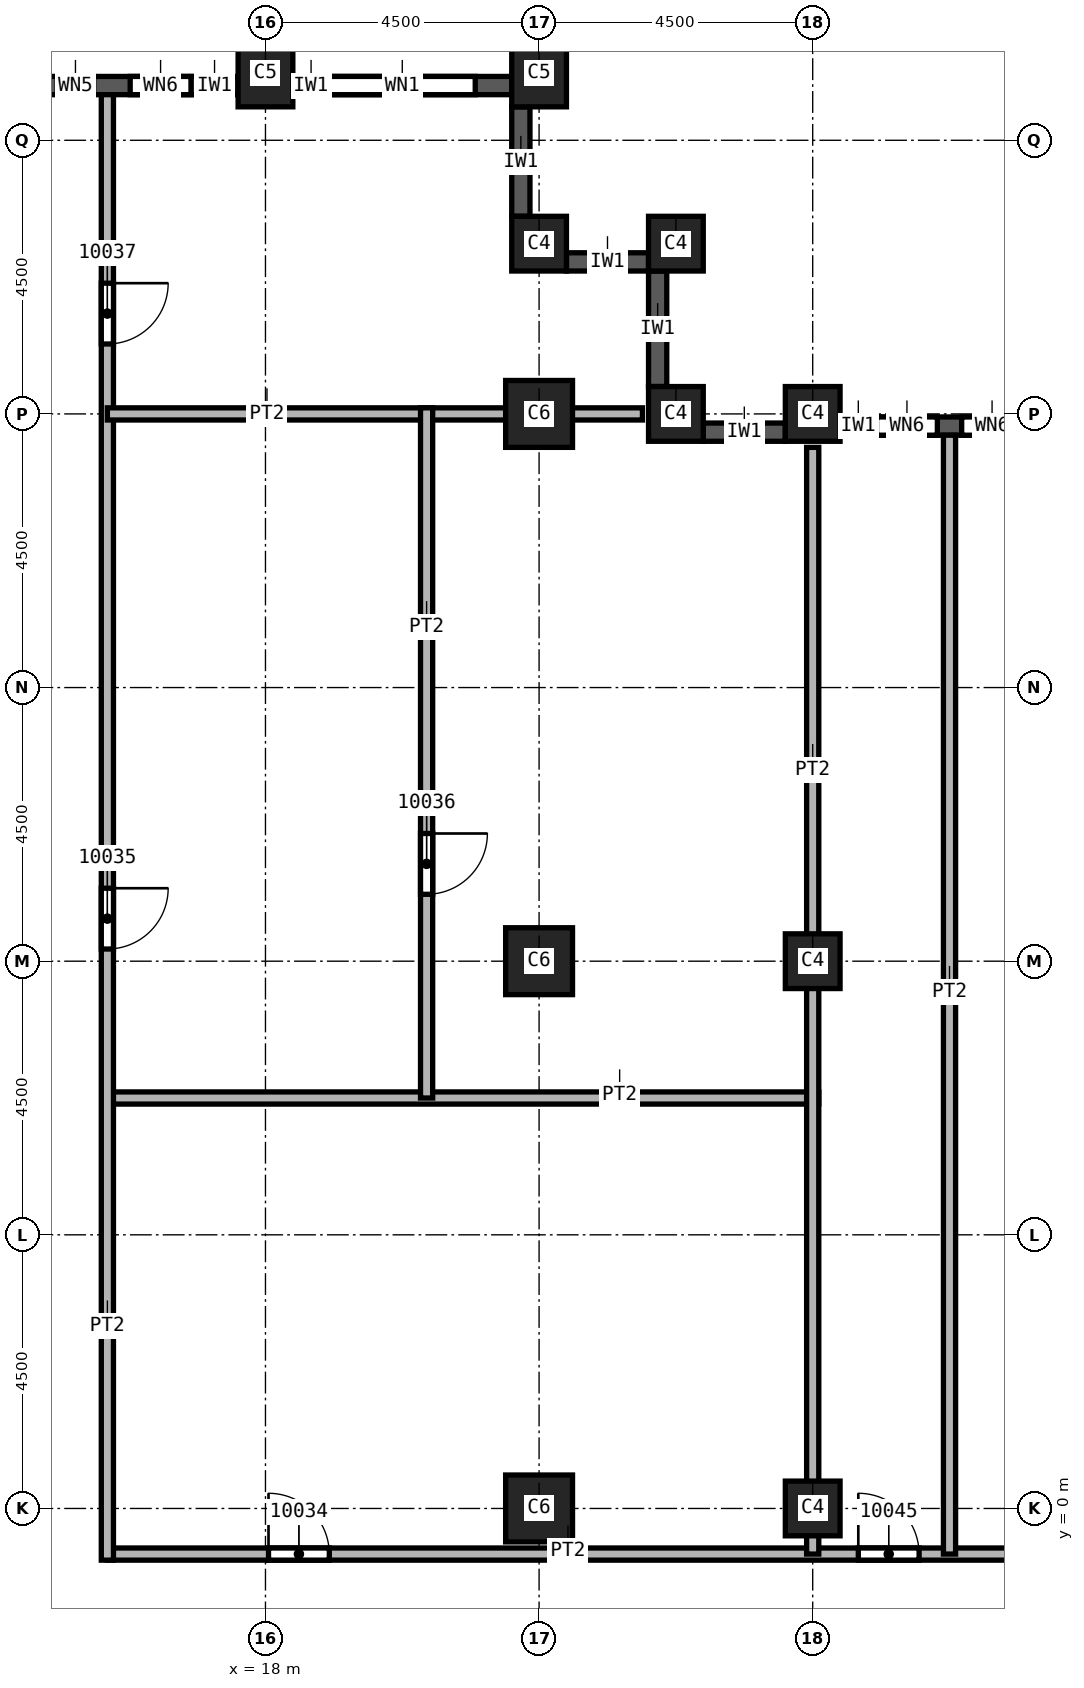
"""IFC4 building model, lengths in metres.
Left out: names, types, materials, properties, quantities, classifications, styles, units other than length and angle.
Written with IfcOpenShell. Run it as: python <this file> out.ifc"""

import sys

from ifc_helpers import new_model, si_unit, direction, frame, frame_2d, origin, origin_2d, place, context, subcontext, project, spatial, rectangle, extrude, element, fill, save


model = new_model("IFC4")
c1 = context("Model", 3, precision=1e-05, world=origin(), true_north=direction((0.0, 1.0)))
c2 = subcontext(c1, "Body", "Model", "MODEL_VIEW")
j1 = project(units=[si_unit("LENGTHUNIT", "METRE"), si_unit("PLANEANGLEUNIT", "RADIAN")], contexts=[c1])
p1 = place(None, origin())
s1 = spatial("IfcSite", under=j1, at=p1, CompositionType="ELEMENT")
p2 = place(p1, origin())
s2 = spatial("IfcBuilding", under=s1, at=p2, CompositionType="ELEMENT")
p3 = place(p2, frame((0.0, 0.0, 170.0)))
s3 = spatial("IfcBuildingStorey", under=s2, at=p3, CompositionType="ELEMENT", Elevation=170.0)
for number, where, z_axis, x_axis in (
    (1, (22.5, 0.0, 0.0), (0.0, 0.0, 1.0), (1.0, 0.0, 0.0)),
    (2, (22.5, 9.0, 0.0), (0.0, 0.0, 1.0), (1.0, 0.0, 0.0)),
    (3, (22.5, 18.0, 0.0), (0.0, 0.0, 1.0), (1.0, 0.0, 0.0)),
):
    element("IfcColumn", number, at=place(p3, frame(where, z_axis=z_axis, x_axis=x_axis)), inside=s3, PredefinedType="COLUMN", context=c2, shape_type="SweptSolid", body=[
        extrude(rectangle(XDim=1.1, YDim=1.1, at=origin_2d()), origin(), (0.0, 0.0, 1.0), 3.7),
    ])
for number, where, z_axis, x_axis in (
    (4, (27.0, 0.0, 0.0), (0.0, 0.0, 1.0), (1.0, 0.0, 0.0)),
    (5, (27.0, 9.0, 0.0), (0.0, 0.0, 1.0), (1.0, 0.0, 0.0)),
    (6, (27.0, 18.0, 0.0), (0.0, 0.0, 1.0), (1.0, 0.0, 0.0)),
):
    element("IfcColumn", number, at=place(p3, frame(where, z_axis=z_axis, x_axis=x_axis)), inside=s3, PredefinedType="COLUMN", context=c2, shape_type="SweptSolid", body=[
        extrude(rectangle(XDim=0.9, YDim=0.9, at=origin_2d()), origin(), (0.0, 0.0, 1.0), 3.7),
    ])
for number, where, z_axis, x_axis in (
    (7, (18.0, 23.6, 0.0), (0.0, 0.0, 1.0), (1.0, 0.0, 0.0)),
    (8, (22.5, 23.6, 0.0), (0.0, 0.0, 1.0), (1.0, 0.0, 0.0)),
):
    element("IfcColumn", number, at=place(p3, frame(where, z_axis=z_axis, x_axis=x_axis)), inside=s3, PredefinedType="COLUMN", context=c2, shape_type="SweptSolid", body=[
        extrude(rectangle(XDim=0.9, YDim=1.1, at=origin_2d()), origin(), (0.0, 0.0, 1.0), 3.7),
    ])
for number, where, z_axis, x_axis in (
    (9, (22.5, 20.8, 0.0), (0.0, 0.0, 1.0), (1.0, 0.0, 0.0)),
    (10, (24.75, 20.8, 0.0), (0.0, 0.0, 1.0), (1.0, 0.0, 0.0)),
    (11, (24.75, 18.0, 0.0), (0.0, 0.0, 1.0), (1.0, 0.0, 0.0)),
):
    element("IfcColumn", number, at=place(p3, frame(where, z_axis=z_axis, x_axis=x_axis)), inside=s3, PredefinedType="COLUMN", context=c2, shape_type="SweptSolid", body=[
        extrude(rectangle(XDim=0.9, YDim=0.9, at=origin_2d()), origin(), (0.0, 0.0, 1.0), 3.7),
    ])
p4 = place(p3, frame((31.05, 17.8, 0.0), z_axis=(0.0, 0.0, 1.0), x_axis=(-1.0, 0.0, 0.0)))
e12 = element("IfcWall", 12, at=p4, inside=s3, PredefinedType="SOLIDWALL", context=c2, shape_type="SweptSolid", body=[
    extrude(rectangle(XDim=3.6, YDim=0.3, at=frame_2d((1.8, 0.0))), origin(), (0.0, 0.0, 1.0), 3.1),
])
p5 = place(p4, frame((0.6, 0.0, 0.8)))
e13 = element("IfcOpeningElement", 13, at=p5, cuts=e12, PredefinedType="OPENING", context=c2, shape_type="SweptSolid", body=[
    extrude(rectangle(XDim=1.0, YDim=1.95, at=frame_2d((0.5, 0.975))), frame((0.0, 0.15, 0.0), z_axis=(0.0, -1.0, 0.0), x_axis=(1.0, 0.0, 0.0)), (0.0, 0.0, 1.0), 0.3),
])
p6 = place(p4, frame((2.0, 0.0, 0.8)))
e14 = element("IfcOpeningElement", 14, at=p6, cuts=e12, PredefinedType="OPENING", context=c2, shape_type="SweptSolid", body=[
    extrude(rectangle(XDim=1.0, YDim=1.95, at=frame_2d((0.5, 0.975))), frame((0.0, 0.15, 0.0), z_axis=(0.0, -1.0, 0.0), x_axis=(1.0, 0.0, 0.0)), (0.0, 0.0, 1.0), 0.3),
])
p7 = place(p3, frame((26.55, 17.7, 0.0), z_axis=(0.0, 0.0, 1.0), x_axis=(-1.0, 0.0, 0.0)))
e15 = element("IfcWall", 15, at=p7, inside=s3, PredefinedType="SOLIDWALL", context=c2, shape_type="SweptSolid", body=[
    extrude(rectangle(XDim=1.35, YDim=0.3, at=frame_2d((0.675, 0.0))), origin(), (0.0, 0.0, 1.0), 3.1),
])
p8 = place(p3, frame((24.45, 18.45, 0.0), z_axis=(0.0, 0.0, 1.0), x_axis=(0.0, 1.0, 0.0)))
e16 = element("IfcWall", 16, at=p8, inside=s3, PredefinedType="SOLIDWALL", context=c2, shape_type="SweptSolid", body=[
    extrude(rectangle(XDim=1.9, YDim=0.3, at=frame_2d((0.95, 0.0))), origin(), (0.0, 0.0, 1.0), 3.1),
])
p9 = place(p3, frame((24.3, 20.5, 0.0), z_axis=(0.0, 0.0, 1.0), x_axis=(-1.0, 0.0, 0.0)))
e17 = element("IfcWall", 17, at=p9, inside=s3, PredefinedType="SOLIDWALL", context=c2, shape_type="SweptSolid", body=[
    extrude(rectangle(XDim=1.35, YDim=0.3, at=frame_2d((0.675, 0.0))), origin(), (0.0, 0.0, 1.0), 3.1),
])
p10 = place(p3, frame((22.2, 21.25, 0.0), z_axis=(0.0, 0.0, 1.0), x_axis=(0.0, 1.0, 0.0)))
e18 = element("IfcWall", 18, at=p10, inside=s3, PredefinedType="SOLIDWALL", context=c2, shape_type="SweptSolid", body=[
    extrude(rectangle(XDim=1.8, YDim=0.3, at=frame_2d((0.9, 0.0))), origin(), (0.0, 0.0, 1.0), 3.1),
])
p11 = place(p3, frame((22.05, 23.4, 0.0), z_axis=(0.0, 0.0, 1.0), x_axis=(-1.0, 0.0, 0.0)))
e19 = element("IfcWall", 19, at=p11, inside=s3, PredefinedType="SOLIDWALL", context=c2, shape_type="SweptSolid", body=[
    extrude(rectangle(XDim=3.6, YDim=0.3, at=frame_2d((1.8, 0.0))), origin(), (0.0, 0.0, 1.0), 3.1),
])
p12 = place(p11, frame((0.6, 0.0, 0.8)))
e20 = element("IfcOpeningElement", 20, at=p12, cuts=e19, PredefinedType="OPENING", context=c2, shape_type="SweptSolid", body=[
    extrude(rectangle(XDim=2.4, YDim=1.95, at=frame_2d((1.2, 0.975))), frame((0.0, 0.15, 0.0), z_axis=(0.0, -1.0, 0.0), x_axis=(1.0, 0.0, 0.0)), (0.0, 0.0, 1.0), 0.3),
])
p13 = place(p3, frame((17.55, 23.4, 0.0), z_axis=(0.0, 0.0, 1.0), x_axis=(-1.0, 0.0, 0.0)))
e21 = element("IfcWall", 21, at=p13, inside=s3, PredefinedType="SOLIDWALL", context=c2, shape_type="SweptSolid", body=[
    extrude(rectangle(XDim=3.6, YDim=0.3, at=frame_2d((1.8, 0.0))), origin(), (0.0, 0.0, 1.0), 3.1),
])
p14 = place(p13, frame((0.775, 0.0, 0.8)))
e22 = element("IfcOpeningElement", 22, at=p14, cuts=e21, PredefinedType="OPENING", context=c2, shape_type="SweptSolid", body=[
    extrude(rectangle(XDim=1.0, YDim=1.95, at=frame_2d((0.5, 0.975))), frame((0.0, 0.15, 0.0), z_axis=(0.0, -1.0, 0.0), x_axis=(1.0, 0.0, 0.0)), (0.0, 0.0, 1.0), 0.3),
])
p15 = place(p13, frame((2.375, 0.0, 0.8)))
e23 = element("IfcOpeningElement", 23, at=p15, cuts=e21, PredefinedType="OPENING", context=c2, shape_type="SweptSolid", body=[
    extrude(rectangle(XDim=0.6, YDim=1.95, at=frame_2d((0.3, 0.975))), frame((0.0, 0.15, 0.0), z_axis=(0.0, -1.0, 0.0), x_axis=(1.0, 0.0, 0.0)), (0.0, 0.0, 1.0), 0.3),
])
p16 = place(p3, frame((15.4, -0.75, 0.0), z_axis=(0.0, 0.0, 1.0), x_axis=(1.0, 0.0, 0.0)))
e24 = element("IfcWall", 24, at=p16, inside=s3, PredefinedType="PARTITIONING", context=c2, shape_type="SweptSolid", body=[
    extrude(rectangle(XDim=18.45, YDim=0.2, at=frame_2d((9.225, 0.0))), origin(), (0.0, 0.0, 1.0), 3.7),
])
p17 = place(p16, frame((2.65, 0.0, 0.0)))
e25 = element("IfcOpeningElement", 25, at=p17, cuts=e24, PredefinedType="OPENING", context=c2, shape_type="SweptSolid", body=[
    extrude(rectangle(XDim=1.0, YDim=2.1, at=frame_2d((0.5, 1.05))), frame((0.0, 0.1, 0.0), z_axis=(0.0, -1.0, 0.0), x_axis=(1.0, 0.0, 0.0)), (0.0, 0.0, 1.0), 0.2),
])
p18 = place(p16, frame((12.35, 0.0, 0.0)))
e26 = element("IfcOpeningElement", 26, at=p18, cuts=e24, PredefinedType="OPENING", context=c2, shape_type="SweptSolid", body=[
    extrude(rectangle(XDim=1.0, YDim=2.1, at=frame_2d((0.5, 1.05))), frame((0.0, 0.1, 0.0), z_axis=(0.0, -1.0, 0.0), x_axis=(1.0, 0.0, 0.0)), (0.0, 0.0, 1.0), 0.2),
])
p19 = place(p3, frame((15.4, 6.75, 0.0), z_axis=(0.0, 0.0, 1.0), x_axis=(1.0, 0.0, 0.0)))
e27 = element("IfcWall", 27, at=p19, inside=s3, PredefinedType="PARTITIONING", context=c2, shape_type="SweptSolid", body=[
    extrude(rectangle(XDim=11.7, YDim=0.2, at=frame_2d((5.85, 0.0))), origin(), (0.0, 0.0, 1.0), 3.7),
])
p20 = place(p3, frame((15.4, 23.25, 0.0), z_axis=(0.0, 0.0, 1.0), x_axis=(0.0, -1.0, 0.0)))
e28 = element("IfcWall", 28, at=p20, inside=s3, PredefinedType="PARTITIONING", context=c2, shape_type="SweptSolid", body=[
    extrude(rectangle(XDim=24.1, YDim=0.2, at=frame_2d((12.05, 0.0))), origin(), (0.0, 0.0, 1.0), 3.7),
])
p21 = place(p20, frame((13.05, 0.0, 0.0)))
e29 = element("IfcOpeningElement", 29, at=p21, cuts=e28, PredefinedType="OPENING", context=c2, shape_type="SweptSolid", body=[
    extrude(rectangle(XDim=1.0, YDim=2.1, at=frame_2d((0.5, 1.05))), frame((0.0, 0.1, 0.0), z_axis=(0.0, -1.0, 0.0), x_axis=(1.0, 0.0, 0.0)), (0.0, 0.0, 1.0), 0.2),
])
p22 = place(p20, frame((3.1, 0.0, 0.0)))
e30 = element("IfcOpeningElement", 30, at=p22, cuts=e28, PredefinedType="OPENING", context=c2, shape_type="SweptSolid", body=[
    extrude(rectangle(XDim=1.0, YDim=2.1, at=frame_2d((0.5, 1.05))), frame((0.0, 0.1, 0.0), z_axis=(0.0, -1.0, 0.0), x_axis=(1.0, 0.0, 0.0)), (0.0, 0.0, 1.0), 0.2),
])
p23 = place(p3, frame((15.4, 18.0, 0.0), z_axis=(0.0, 0.0, 1.0), x_axis=(1.0, 0.0, 0.0)))
e31 = element("IfcWall", 31, at=p23, inside=s3, PredefinedType="PARTITIONING", context=c2, shape_type="SweptSolid", body=[
    extrude(rectangle(XDim=8.8, YDim=0.2, at=frame_2d((4.4, 0.0))), origin(), (0.0, 0.0, 1.0), 3.7),
])
p24 = place(p3, frame((20.65, 18.1, 0.0), z_axis=(0.0, 0.0, 1.0), x_axis=(0.0, -1.0, 0.0)))
e32 = element("IfcWall", 32, at=p24, inside=s3, PredefinedType="PARTITIONING", context=c2, shape_type="SweptSolid", body=[
    extrude(rectangle(XDim=11.35, YDim=0.2, at=frame_2d((5.675, 0.0))), origin(), (0.0, 0.0, 1.0), 3.7),
])
p25 = place(p24, frame((7.0, 0.0, 0.0)))
e33 = element("IfcOpeningElement", 33, at=p25, cuts=e32, PredefinedType="OPENING", context=c2, shape_type="SweptSolid", body=[
    extrude(rectangle(XDim=1.0, YDim=2.1, at=frame_2d((0.5, 1.05))), frame((0.0, 0.1, 0.0), z_axis=(0.0, -1.0, 0.0), x_axis=(1.0, 0.0, 0.0)), (0.0, 0.0, 1.0), 0.2),
])
p26 = place(p3, frame((27.0, 17.45, 0.0), z_axis=(0.0, 0.0, 1.0), x_axis=(0.0, -1.0, 0.0)))
e34 = element("IfcWall", 34, at=p26, inside=s3, PredefinedType="PARTITIONING", context=c2, shape_type="SweptSolid", body=[
    extrude(rectangle(XDim=18.2, YDim=0.2, at=frame_2d((9.1, 0.0))), origin(), (0.0, 0.0, 1.0), 3.7),
])
p27 = place(p3, frame((29.25, 17.65, 0.0), z_axis=(0.0, 0.0, 1.0), x_axis=(0.0, -1.0, 0.0)))
e35 = element("IfcWall", 35, at=p27, inside=s3, PredefinedType="PARTITIONING", context=c2, shape_type="SweptSolid", body=[
    extrude(rectangle(XDim=18.4, YDim=0.2, at=frame_2d((9.2, 0.0))), origin(), (0.0, 0.0, 1.0), 3.7),
])
p28 = place(p12, origin())
e36 = element("IfcWindow", 36, at=p28, inside=s3, PartitioningType="SINGLE_PANEL", PredefinedType="WINDOW", context=c2, shape_type="SweptSolid", body=[
    extrude(rectangle(XDim=2.4, YDim=1.95, at=frame_2d((1.2, 0.975))), frame((0.0, 0.03, 0.0), z_axis=(0.0, -1.0, 0.0), x_axis=(1.0, 0.0, 0.0)), (0.0, 0.0, 1.0), 0.06),
])
fill(e20, e36)
p29 = place(p17, origin())
e37 = element("IfcDoor", 37, at=p29, inside=s3, OperationType="SINGLE_SWING_LEFT", PredefinedType="DOOR", context=c2, shape_type="SweptSolid", body=[
    extrude(rectangle(XDim=1.0, YDim=2.1, at=frame_2d((0.5, 1.05))), frame((0.0, 0.025, 0.0), z_axis=(0.0, -1.0, 0.0), x_axis=(1.0, 0.0, 0.0)), (0.0, 0.0, 1.0), 0.05),
])
fill(e25, e37)
p30 = place(p21, origin())
e38 = element("IfcDoor", 38, at=p30, inside=s3, OperationType="SINGLE_SWING_RIGHT", PredefinedType="DOOR", context=c2, shape_type="SweptSolid", body=[
    extrude(rectangle(XDim=1.0, YDim=2.1, at=frame_2d((0.5, 1.05))), frame((0.0, 0.025, 0.0), z_axis=(0.0, -1.0, 0.0), x_axis=(1.0, 0.0, 0.0)), (0.0, 0.0, 1.0), 0.05),
])
fill(e29, e38)
p31 = place(p25, origin())
e39 = element("IfcDoor", 39, at=p31, inside=s3, OperationType="SINGLE_SWING_LEFT", PredefinedType="DOOR", context=c2, shape_type="SweptSolid", body=[
    extrude(rectangle(XDim=1.0, YDim=2.1, at=frame_2d((0.5, 1.05))), frame((0.0, 0.025, 0.0), z_axis=(0.0, -1.0, 0.0), x_axis=(1.0, 0.0, 0.0)), (0.0, 0.0, 1.0), 0.05),
])
fill(e33, e39)
p32 = place(p22, origin())
e40 = element("IfcDoor", 40, at=p32, inside=s3, OperationType="SINGLE_SWING_RIGHT", PredefinedType="DOOR", context=c2, shape_type="SweptSolid", body=[
    extrude(rectangle(XDim=1.0, YDim=2.1, at=frame_2d((0.5, 1.05))), frame((0.0, 0.025, 0.0), z_axis=(0.0, -1.0, 0.0), x_axis=(1.0, 0.0, 0.0)), (0.0, 0.0, 1.0), 0.05),
])
fill(e30, e40)
p33 = place(p18, origin())
e41 = element("IfcDoor", 41, at=p33, inside=s3, OperationType="SINGLE_SWING_RIGHT", PredefinedType="DOOR", context=c2, shape_type="SweptSolid", body=[
    extrude(rectangle(XDim=1.0, YDim=2.1, at=frame_2d((0.5, 1.05))), frame((0.0, 0.025, 0.0), z_axis=(0.0, -1.0, 0.0), x_axis=(1.0, 0.0, 0.0)), (0.0, 0.0, 1.0), 0.05),
])
fill(e26, e41)
p34 = place(p5, origin())
e42 = element("IfcWindow", 42, at=p34, inside=s3, PartitioningType="SINGLE_PANEL", PredefinedType="WINDOW", context=c2, shape_type="SweptSolid", body=[
    extrude(rectangle(XDim=1.0, YDim=1.95, at=frame_2d((0.5, 0.975))), frame((0.0, 0.03, 0.0), z_axis=(0.0, -1.0, 0.0), x_axis=(1.0, 0.0, 0.0)), (0.0, 0.0, 1.0), 0.06),
])
fill(e13, e42)
p35 = place(p6, origin())
e43 = element("IfcWindow", 43, at=p35, inside=s3, PartitioningType="SINGLE_PANEL", PredefinedType="WINDOW", context=c2, shape_type="SweptSolid", body=[
    extrude(rectangle(XDim=1.0, YDim=1.95, at=frame_2d((0.5, 0.975))), frame((0.0, 0.03, 0.0), z_axis=(0.0, -1.0, 0.0), x_axis=(1.0, 0.0, 0.0)), (0.0, 0.0, 1.0), 0.06),
])
fill(e14, e43)
p36 = place(p14, origin())
e44 = element("IfcWindow", 44, at=p36, inside=s3, PartitioningType="SINGLE_PANEL", PredefinedType="WINDOW", context=c2, shape_type="SweptSolid", body=[
    extrude(rectangle(XDim=1.0, YDim=1.95, at=frame_2d((0.5, 0.975))), frame((0.0, 0.03, 0.0), z_axis=(0.0, -1.0, 0.0), x_axis=(1.0, 0.0, 0.0)), (0.0, 0.0, 1.0), 0.06),
])
fill(e22, e44)
p37 = place(p15, origin())
e45 = element("IfcWindow", 45, at=p37, inside=s3, PartitioningType="SINGLE_PANEL", PredefinedType="WINDOW", context=c2, shape_type="SweptSolid", body=[
    extrude(rectangle(XDim=0.6, YDim=1.95, at=frame_2d((0.3, 0.975))), frame((0.0, 0.03, 0.0), z_axis=(0.0, -1.0, 0.0), x_axis=(1.0, 0.0, 0.0)), (0.0, 0.0, 1.0), 0.06),
])
fill(e23, e45)
save(model, sys.argv[1])
